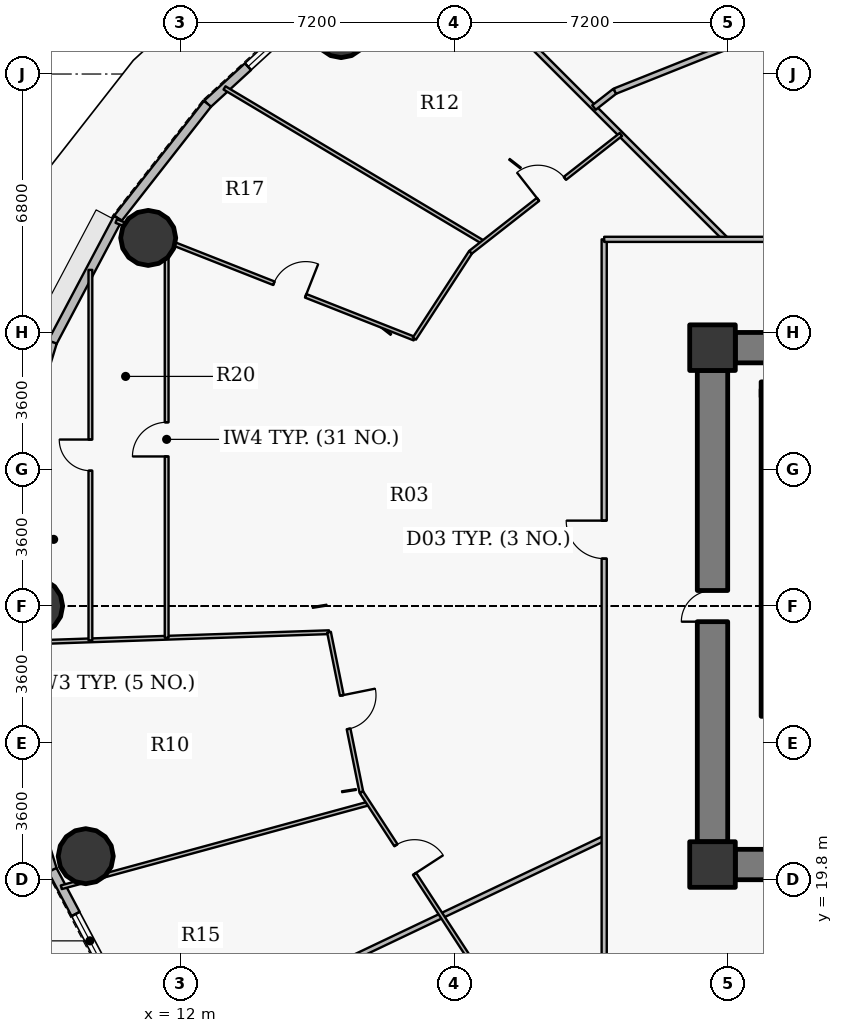
"""IFC4 building model, lengths in metres.
Left out: names, types, materials, properties, quantities, classifications, styles, units other than length and angle.
Written with IfcOpenShell. Run it as: python <this file> out.ifc"""

import sys

from ifc_helpers import new_model, si_unit, direction, frame, frame_2d, origin, origin_2d, place, context, subcontext, project, spatial, rectangle, hollow_circle, extrude, source, transform, mapped, element, fill, save


model = new_model("IFC4")
c1 = context("Model", 3, precision=1e-05, world=origin(), true_north=direction((0.0, 1.0)))
c2 = subcontext(c1, "Body", "Model", "MODEL_VIEW")
j1 = project(units=[si_unit("LENGTHUNIT", "METRE"), si_unit("PLANEANGLEUNIT", "RADIAN")], contexts=[c1])
p1 = place(None, origin())
s1 = spatial("IfcSite", under=j1, at=p1, CompositionType="ELEMENT")
p2 = place(p1, origin())
s2 = spatial("IfcBuilding", under=s1, at=p2, CompositionType="ELEMENT")
p3 = place(p2, frame((0.0, 0.0, 92.4)))
s3 = spatial("IfcBuildingStorey", under=s2, at=p3, CompositionType="ELEMENT", Elevation=92.4)
for number, where, z_axis, x_axis in (
    (1, (26.0, 20.2, 0.0), (0.0, 0.0, 1.0), (1.0, 0.0, 0.0)),
    (2, (26.0, 33.8, 0.0), (0.0, 0.0, 1.0), (1.0, 0.0, 0.0)),
):
    element("IfcColumn", number, at=place(p3, frame(where, z_axis=z_axis, x_axis=x_axis)), inside=s3, PredefinedType="COLUMN", context=c2, shape_type="SweptSolid", body=[
        extrude(rectangle(XDim=1.2, YDim=1.2, at=origin_2d()), origin(), (0.0, 0.0, 1.0), 4.8),
    ])
p4 = place(p3, frame((27.48, 24.1, 0.0), z_axis=(0.0, 0.0, 1.0), x_axis=(0.0, 1.0, 0.0)))
e3 = element("IfcWall", 3, at=p4, inside=s3, PredefinedType="SHEAR", context=c2, shape_type="SweptSolid", body=[
    extrude(rectangle(XDim=8.6, YDim=0.4, at=frame_2d((4.3, 0.0))), origin(), (0.0, 0.0, 1.0), 4.8),
])
p5 = place(p3, frame((27.28, 32.7, 0.0), z_axis=(0.0, 0.0, 1.0), x_axis=(1.0, 0.0, 0.0)))
e4 = element("IfcWall", 4, at=p5, inside=s3, PredefinedType="SHEAR", context=c2, shape_type="SweptSolid", body=[
    extrude(rectangle(XDim=4.1, YDim=0.4, at=frame_2d((2.05, 0.0))), origin(), (0.0, 0.0, 1.0), 4.8),
])
p6 = place(p3, frame((26.6, 33.8, 0.0), z_axis=(0.0, 0.0, 1.0), x_axis=(1.0, 0.0, 0.0)))
e5 = element("IfcWall", 5, at=p6, inside=s3, PredefinedType="SHEAR", context=c2, shape_type="SweptSolid", body=[
    extrude(rectangle(XDim=18.8, YDim=0.8, at=frame_2d((9.4, 0.0))), origin(), (0.0, 0.0, 1.0), 4.0),
])
p7 = place(p3, frame((45.4, 20.2, 0.0), z_axis=(0.0, 0.0, 1.0), x_axis=(-1.0, 0.0, 0.0)))
e6 = element("IfcWall", 6, at=p7, inside=s3, PredefinedType="SHEAR", context=c2, shape_type="SweptSolid", body=[
    extrude(rectangle(XDim=18.8, YDim=0.8, at=frame_2d((9.4, 0.0))), origin(), (0.0, 0.0, 1.0), 4.0),
])
p8 = place(p7, frame((10.15, 0.0, 0.0)))
e7 = element("IfcOpeningElement", 7, at=p8, cuts=e6, PredefinedType="OPENING", context=c2, shape_type="SweptSolid", body=[
    extrude(rectangle(XDim=1.15, YDim=2.15, at=origin_2d()), frame((0.575, 0.41, 1.075), z_axis=(0.0, -1.0, 0.0), x_axis=(1.0, 0.0, 0.0)), (0.0, 0.0, 1.0), 0.82),
])
p9 = place(p3, frame((26.0, 20.8, 0.0), z_axis=(0.0, 0.0, 1.0), x_axis=(0.0, 1.0, 0.0)))
e8 = element("IfcWall", 8, at=p9, inside=s3, PredefinedType="SHEAR", context=c2, shape_type="SweptSolid", body=[
    extrude(rectangle(XDim=12.4, YDim=0.8, at=frame_2d((6.2, 0.0))), origin(), (0.0, 0.0, 1.0), 4.0),
])
p10 = place(p9, frame((5.79, 0.0, 0.0)))
e9 = element("IfcOpeningElement", 9, at=p10, cuts=e8, PredefinedType="OPENING", context=c2, shape_type="SweptSolid", body=[
    extrude(rectangle(XDim=0.82, YDim=2.1, at=origin_2d()), frame((0.41, 0.41, 1.05), z_axis=(0.0, -1.0, 0.0), x_axis=(1.0, 0.0, 0.0)), (0.0, 0.0, 1.0), 0.82),
])
for number, where, z_axis, x_axis in (
    (10, (16.227, 42.156, -0.3), (0.0, 0.0, 1.0), (1.0, 0.0, 0.0)),
    (11, (11.151, 36.688, -0.3), (0.0, 0.0, 1.0), (1.0, 0.0, 0.0)),
    (12, (8.175, 27.0, -0.3), (0.0, 0.0, 1.0), (1.0, 0.0, 0.0)),
    (13, (9.507, 20.419, -0.3), (0.0, 0.0, 1.0), (1.0, 0.0, 0.0)),
):
    element("IfcColumn", number, at=place(p3, frame(where, z_axis=z_axis, x_axis=x_axis)), inside=s3, PredefinedType="COLUMN", context=c2, shape_type="SweptSolid", body=[
        extrude(hollow_circle(Radius=0.725, WallThickness=0.042, at=origin_2d()), origin(), (0.0, 0.0, 1.0), 5.1),
    ])
p11 = place(p3, frame((12.711, 40.217, 0.0), z_axis=(0.0, 0.0, 1.0), x_axis=(0.737113356241, 0.675769117414, 0.0)))
e14 = element("IfcWall", 14, at=p11, inside=s3, PredefinedType="SOLIDWALL", context=c2, shape_type="SweptSolid", body=[
    extrude(rectangle(XDim=3.976, YDim=0.24, at=frame_2d((1.988, 0.0))), origin(), (0.0, 0.0, 1.0), 4.55),
])
p12 = place(p11, frame((1.447, 0.0, 0.9)))
e15 = element("IfcOpeningElement", 15, at=p12, cuts=e14, PredefinedType="OPENING", context=c2, shape_type="SweptSolid", body=[
    extrude(rectangle(XDim=1.25, YDim=1.65, at=origin_2d()), frame((0.625, 0.13, 0.825), z_axis=(0.0, -1.0, 0.0), x_axis=(1.0, 0.0, 0.0)), (0.0, 0.0, 1.0), 0.26),
])
p13 = place(p3, frame((10.355, 37.206, 0.0), z_axis=(0.0, 0.0, 1.0), x_axis=(0.616272103517, 0.787533297345, 0.0)))
e16 = element("IfcWall", 16, at=p13, inside=s3, PredefinedType="SOLIDWALL", context=c2, shape_type="SweptSolid", body=[
    extrude(rectangle(XDim=3.823, YDim=0.24, at=frame_2d((1.912, 0.0))), origin(), (0.0, 0.0, 1.0), 4.55),
])
p14 = place(p3, frame((8.63, 33.945, 0.0), z_axis=(0.0, 0.0, 1.0), x_axis=(0.467614004126, 0.883932770716, 0.0)))
e17 = element("IfcWall", 17, at=p14, inside=s3, PredefinedType="SOLIDWALL", context=c2, shape_type="SweptSolid", body=[
    extrude(rectangle(XDim=3.689, YDim=0.24, at=frame_2d((1.844, 0.0))), origin(), (0.0, 0.0, 1.0), 4.55),
])
p15 = place(p3, frame((7.578, 30.515, 0.0), z_axis=(0.0, 0.0, 1.0), x_axis=(0.293124431344, 0.956074300329, 0.0)))
e18 = element("IfcWall", 18, at=p15, inside=s3, PredefinedType="SOLIDWALL", context=c2, shape_type="SweptSolid", body=[
    extrude(rectangle(XDim=3.587, YDim=0.24, at=frame_2d((1.793, 0.0))), origin(), (0.0, 0.0, 1.0), 4.55),
])
p16 = place(p15, frame((0.794, 0.0, 0.9)))
e19 = element("IfcOpeningElement", 19, at=p16, cuts=e18, PredefinedType="OPENING", context=c2, shape_type="SweptSolid", body=[
    extrude(rectangle(XDim=2.0, YDim=1.75, at=origin_2d()), frame((1.0, 0.13, 0.875), z_axis=(0.0, -1.0, 0.0), x_axis=(1.0, 0.0, 0.0)), (0.0, 0.0, 1.0), 0.26),
])
p17 = place(p3, frame((8.63, 20.055, 0.0), z_axis=(0.0, 0.0, 1.0), x_axis=(-0.293124431344, 0.956074300329, 0.0)))
e20 = element("IfcWall", 20, at=p17, inside=s3, PredefinedType="SOLIDWALL", context=c2, shape_type="SweptSolid", body=[
    extrude(rectangle(XDim=3.587, YDim=0.24, at=frame_2d((1.793, 0.0))), origin(), (0.0, 0.0, 1.0), 4.55),
])
p18 = place(p3, frame((10.355, 16.794, 0.0), z_axis=(0.0, 0.0, 1.0), x_axis=(-0.467614004126, 0.883932770716, 0.0)))
e21 = element("IfcWall", 21, at=p18, inside=s3, PredefinedType="SOLIDWALL", context=c2, shape_type="SweptSolid", body=[
    extrude(rectangle(XDim=3.689, YDim=0.24, at=frame_2d((1.844, 0.0))), origin(), (0.0, 0.0, 1.0), 4.55),
])
p19 = place(p18, frame((0.781, 0.0, 0.9)))
e22 = element("IfcOpeningElement", 22, at=p19, cuts=e21, PredefinedType="OPENING", context=c2, shape_type="SweptSolid", body=[
    extrude(rectangle(XDim=1.6, YDim=1.75, at=origin_2d()), frame((0.8, 0.13, 0.875), z_axis=(0.0, -1.0, 0.0), x_axis=(1.0, 0.0, 0.0)), (0.0, 0.0, 1.0), 0.26),
])
p20 = place(p3, frame((7.319, 26.019, 0.0), z_axis=(0.0, 0.0, 1.0), x_axis=(0.999416042933, 0.034169769216, 0.0)))
e23 = element("IfcWall", 23, at=p20, inside=s3, PredefinedType="PARTITIONING", context=c2, shape_type="SweptSolid", body=[
    extrude(rectangle(XDim=8.595, YDim=0.1, at=frame_2d((4.298, 0.0))), origin(), (0.0, 0.0, 1.0), 3.985),
])
p21 = place(p3, frame((8.864, 19.602, 0.0), z_axis=(0.0, 0.0, 1.0), x_axis=(0.964794050911, 0.263006538565, 0.0)))
e24 = element("IfcWall", 24, at=p21, inside=s3, PredefinedType="PARTITIONING", context=c2, shape_type="SweptSolid", body=[
    extrude(rectangle(XDim=8.385, YDim=0.1, at=frame_2d((4.192, 0.0))), origin(), (0.0, 0.0, 1.0), 3.985),
])
p22 = place(p3, frame((9.63, 26.098, 0.0), z_axis=(0.0, 0.0, 1.0), x_axis=(0.0, 1.0, 0.0)))
e25 = element("IfcWall", 25, at=p22, inside=s3, PredefinedType="PARTITIONING", context=c2, shape_type="SweptSolid", body=[
    extrude(rectangle(XDim=9.748, YDim=0.1, at=frame_2d((4.874, 0.0))), origin(), (0.0, 0.0, 1.0), 3.985),
])
p23 = place(p22, frame((4.464, 0.0, 0.0)))
e26 = element("IfcOpeningElement", 26, at=p23, cuts=e25, PredefinedType="OPENING", context=c2, shape_type="SweptSolid", body=[
    extrude(rectangle(XDim=0.82, YDim=2.1, at=origin_2d()), frame((0.41, 0.06, 1.05), z_axis=(0.0, -1.0, 0.0), x_axis=(1.0, 0.0, 0.0)), (0.0, 0.0, 1.0), 0.12),
])
p24 = place(p3, frame((10.309, 37.131, 0.0), z_axis=(0.0, 0.0, 1.0), x_axis=(0.930286568853, -0.366833613251, 0.0)))
e27 = element("IfcWall", 27, at=p24, inside=s3, PredefinedType="PARTITIONING", context=c2, shape_type="SweptSolid", body=[
    extrude(rectangle(XDim=8.432, YDim=0.1, at=frame_2d((4.216, 0.0))), origin(), (0.0, 0.0, 1.0), 3.985),
])
p25 = place(p24, frame((4.459, 0.0, 0.0)))
e28 = element("IfcOpeningElement", 28, at=p25, cuts=e27, PredefinedType="OPENING", context=c2, shape_type="SweptSolid", body=[
    extrude(rectangle(XDim=0.9, YDim=2.1, at=origin_2d()), frame((0.45, 0.06, 1.05), z_axis=(0.0, -1.0, 0.0), x_axis=(1.0, 0.0, 0.0)), (0.0, 0.0, 1.0), 0.12),
])
p26 = place(p3, frame((11.486, 15.34, 0.0), z_axis=(0.0, 0.0, 1.0), x_axis=(0.903055043221, 0.429524840857, 0.0)))
e29 = element("IfcWall", 29, at=p26, inside=s3, PredefinedType="PARTITIONING", context=c2, shape_type="SweptSolid", body=[
    extrude(rectangle(XDim=12.916, YDim=0.135, at=frame_2d((6.458, 0.0))), origin(), (0.0, 0.0, 1.0), 3.985),
])
p27 = place(p3, frame((11.636, 26.167, 0.0), z_axis=(0.0, 0.0, 1.0), x_axis=(0.0, 1.0, 0.0)))
e30 = element("IfcWall", 30, at=p27, inside=s3, PredefinedType="PARTITIONING", context=c2, shape_type="SweptSolid", body=[
    extrude(rectangle(XDim=10.44, YDim=0.1, at=frame_2d((5.22, 0.0))), origin(), (0.0, 0.0, 1.0), 3.985),
])
p28 = place(p27, frame((4.77, 0.0, 0.0)))
e31 = element("IfcOpeningElement", 31, at=p28, cuts=e30, PredefinedType="OPENING", context=c2, shape_type="SweptSolid", body=[
    extrude(rectangle(XDim=0.9, YDim=2.1, at=origin_2d()), frame((0.45, 0.06, 1.05), z_axis=(0.0, -1.0, 0.0), x_axis=(1.0, 0.0, 0.0)), (0.0, 0.0, 1.0), 0.12),
])
p29 = place(p3, frame((13.159, 40.634, 0.0), z_axis=(0.0, 0.0, 1.0), x_axis=(0.858651150201, -0.512560437664, 0.0)))
e32 = element("IfcWall", 32, at=p29, inside=s3, PredefinedType="PARTITIONING", context=c2, shape_type="SweptSolid", body=[
    extrude(rectangle(XDim=7.927, YDim=0.1, at=frame_2d((3.963, 0.0))), origin(), (0.0, 0.0, 1.0), 3.985),
])
p30 = place(p3, frame((15.909, 26.313, 0.0), z_axis=(0.0, 0.0, 1.0), x_axis=(0.198237240658, -0.980154067694, 0.0)))
e33 = element("IfcWall", 33, at=p30, inside=s3, PredefinedType="PARTITIONING", context=c2, shape_type="SweptSolid", body=[
    extrude(rectangle(XDim=4.293, YDim=0.1, at=frame_2d((2.146, 0.0))), origin(), (0.0, 0.0, 1.0), 3.985),
])
p31 = place(p30, frame((1.697, 0.0, 0.0)))
e34 = element("IfcOpeningElement", 34, at=p31, cuts=e33, PredefinedType="OPENING", context=c2, shape_type="SweptSolid", body=[
    extrude(rectangle(XDim=0.9, YDim=2.1, at=origin_2d()), frame((0.45, 0.06, 1.05), z_axis=(0.0, -1.0, 0.0), x_axis=(1.0, 0.0, 0.0)), (0.0, 0.0, 1.0), 0.12),
])
p32 = place(p3, frame((16.76, 22.105, 0.0), z_axis=(0.0, 0.0, 1.0), x_axis=(0.545405249109, -0.838172484781, 0.0)))
e35 = element("IfcWall", 35, at=p32, inside=s3, PredefinedType="PARTITIONING", context=c2, shape_type="SweptSolid", body=[
    extrude(rectangle(XDim=5.269, YDim=0.1, at=frame_2d((2.634, 0.0))), origin(), (0.0, 0.0, 1.0), 3.985),
])
p33 = place(p32, frame((1.666, 0.0, 0.0)))
e36 = element("IfcOpeningElement", 36, at=p33, cuts=e35, PredefinedType="OPENING", context=c2, shape_type="SweptSolid", body=[
    extrude(rectangle(XDim=0.9, YDim=2.1, at=origin_2d()), frame((0.45, 0.06, 1.05), z_axis=(0.0, -1.0, 0.0), x_axis=(1.0, 0.0, 0.0)), (0.0, 0.0, 1.0), 0.12),
])
p34 = place(p3, frame((18.154, 34.037, 0.0), z_axis=(0.0, 0.0, 1.0), x_axis=(0.545361556746, 0.838200914115, 0.0)))
e37 = element("IfcWall", 37, at=p34, inside=s3, PredefinedType="PARTITIONING", context=c2, shape_type="SweptSolid", body=[
    extrude(rectangle(XDim=2.713, YDim=0.1, at=frame_2d((1.356, 0.0))), origin(), (0.0, 0.0, 1.0), 3.985),
])
p35 = place(p3, frame((18.308, 44.692, 0.0), z_axis=(0.0, 0.0, 1.0), x_axis=(0.707106781187, -0.707106781187, 0.0)))
e38 = element("IfcWall", 38, at=p35, inside=s3, PredefinedType="PARTITIONING", context=c2, shape_type="SweptSolid", body=[
    extrude(rectangle(XDim=11.374, YDim=0.135, at=frame_2d((5.687, 0.0))), origin(), (0.0, 0.0, 1.0), 3.985),
])
p36 = place(p3, frame((19.634, 36.311, 0.0), z_axis=(0.0, 0.0, 1.0), x_axis=(0.787333773608, 0.616526989625, 0.0)))
e39 = element("IfcWall", 39, at=p36, inside=s3, PredefinedType="PARTITIONING", context=c2, shape_type="SweptSolid", body=[
    extrude(rectangle(XDim=5.026, YDim=0.1, at=frame_2d((2.513, 0.0))), origin(), (0.0, 0.0, 1.0), 3.985),
])
p37 = place(p36, frame((2.254, 0.0, 0.0)))
e40 = element("IfcOpeningElement", 40, at=p37, cuts=e39, PredefinedType="OPENING", context=c2, shape_type="SweptSolid", body=[
    extrude(rectangle(XDim=0.9, YDim=2.1, at=origin_2d()), frame((0.45, 0.06, 1.05), z_axis=(0.0, -1.0, 0.0), x_axis=(1.0, 0.0, 0.0)), (0.0, 0.0, 1.0), 0.12),
])
p38 = place(p3, frame((22.881, 40.119, 0.0), z_axis=(0.0, 0.0, 1.0), x_axis=(0.787460608079, 0.616364981747, 0.0)))
e41 = element("IfcWall", 41, at=p38, inside=s3, PredefinedType="PARTITIONING", context=c2, shape_type="SweptSolid", body=[
    extrude(rectangle(XDim=0.696, YDim=0.15, at=frame_2d((0.348, 0.0))), origin(), (0.0, 0.0, 1.0), 4.55),
])
p39 = place(p3, frame((23.15, 17.35, 0.0), z_axis=(0.0, 0.0, 1.0), x_axis=(0.0, 1.0, 0.0)))
e42 = element("IfcWall", 42, at=p39, inside=s3, PredefinedType="PARTITIONING", context=c2, shape_type="SweptSolid", body=[
    extrude(rectangle(XDim=19.3, YDim=0.135, at=frame_2d((9.65, 0.0))), origin(), (0.0, 0.0, 1.0), 3.985),
])
p40 = place(p39, frame((10.899, 0.0, 0.0)))
e43 = element("IfcOpeningElement", 43, at=p40, cuts=e42, PredefinedType="OPENING", context=c2, shape_type="SweptSolid", body=[
    extrude(rectangle(XDim=1.0, YDim=2.15, at=origin_2d()), frame((0.5, 0.078, 1.075), z_axis=(0.0, -1.0, 0.0), x_axis=(1.0, 0.0, 0.0)), (0.0, 0.0, 1.0), 0.155),
])
p41 = place(p3, frame((23.15, 36.65, 0.0), z_axis=(0.0, 0.0, 1.0), x_axis=(1.0, 0.0, 0.0)))
e44 = element("IfcWall", 44, at=p41, inside=s3, PredefinedType="PARTITIONING", context=c2, shape_type="SweptSolid", body=[
    extrude(rectangle(XDim=25.7, YDim=0.135, at=frame_2d((12.85, 0.0))), origin(), (0.0, 0.0, 1.0), 3.985),
])
p42 = place(p41, frame((13.736, 0.0, 0.0)))
e45 = element("IfcOpeningElement", 45, at=p42, cuts=e44, PredefinedType="OPENING", context=c2, shape_type="SweptSolid", body=[
    extrude(rectangle(XDim=1.05, YDim=2.15, at=origin_2d()), frame((0.525, 0.078, 1.075), z_axis=(0.0, -1.0, 0.0), x_axis=(1.0, 0.0, 0.0)), (0.0, 0.0, 1.0), 0.155),
])
p43 = place(p41, frame((6.195, 0.0, 0.0)))
e46 = element("IfcOpeningElement", 46, at=p43, cuts=e44, PredefinedType="OPENING", context=c2, shape_type="SweptSolid", body=[
    extrude(rectangle(XDim=0.82, YDim=2.1, at=origin_2d()), frame((0.41, 0.078, 1.05), z_axis=(0.0, -1.0, 0.0), x_axis=(1.0, 0.0, 0.0)), (0.0, 0.0, 1.0), 0.155),
])
p44 = place(p3, frame((23.43, 40.548, 0.0), z_axis=(0.0, 0.0, 1.0), x_axis=(0.928798989983, 0.370583912503, 0.0)))
e47 = element("IfcWall", 47, at=p44, inside=s3, PredefinedType="PARTITIONING", context=c2, shape_type="SweptSolid", body=[
    extrude(rectangle(XDim=6.419, YDim=0.15, at=frame_2d((3.209, 0.0))), origin(), (0.0, 0.0, 1.0), 3.985),
])
p45 = place(p3, frame((26.59, 34.2, 0.0), z_axis=(0.0, 0.0, 1.0), x_axis=(-1.0, 0.0, 0.0)))
e48 = element("IfcWall", 48, at=p45, inside=s3, PredefinedType="PARTITIONING", context=c2, shape_type="SweptSolid", body=[
    extrude(rectangle(XDim=0.99, YDim=0.135, at=frame_2d((0.495, 0.0))), origin(), (0.0, 0.0, 1.0), 3.985),
])
p46 = place(p3, frame((25.6, 33.893, 0.0), z_axis=(0.0, 0.0, 1.0), x_axis=(0.0, -1.0, 0.0)))
e49 = element("IfcWall", 49, at=p46, inside=s3, PredefinedType="PARTITIONING", context=c2, shape_type="SweptSolid", body=[
    extrude(rectangle(XDim=0.683, YDim=0.135, at=frame_2d((0.341, 0.0))), origin(), (0.0, 0.0, 1.0), 4.55),
])
p47 = place(p3, frame((25.6, 20.79, 0.0), z_axis=(0.0, 0.0, 1.0), x_axis=(0.0, -1.0, 0.0)))
e50 = element("IfcWall", 50, at=p47, inside=s3, PredefinedType="PARTITIONING", context=c2, shape_type="SweptSolid", body=[
    extrude(rectangle(XDim=0.99, YDim=0.135, at=frame_2d((0.495, 0.0))), origin(), (0.0, 0.0, 1.0), 4.55),
])
p48 = place(p3, frame((25.907, 19.8, 0.0), z_axis=(0.0, 0.0, 1.0), x_axis=(1.0, 0.0, 0.0)))
e51 = element("IfcWall", 51, at=p48, inside=s3, PredefinedType="PARTITIONING", context=c2, shape_type="SweptSolid", body=[
    extrude(rectangle(XDim=0.683, YDim=0.135, at=frame_2d((0.341, 0.0))), origin(), (0.0, 0.0, 1.0), 3.985),
])
m1 = source(origin(), c2, "Body", "SweptSolid", [
    extrude(rectangle(XDim=1.6, YDim=1.75, at=origin_2d()), frame((0.8, 0.03, 0.875), z_axis=(0.0, -1.0, 0.0), x_axis=(1.0, 0.0, 0.0)), (0.0, 0.0, 1.0), 0.06),
])
p49 = place(p19, origin())
e52 = element("IfcWindow", 52, at=p49, inside=s3, PartitioningType="DOUBLE_PANEL_VERTICAL", PredefinedType="WINDOW", context=c2, shape_type="MappedRepresentation", body=[
    mapped(m1, transform((0.0, 0.0, 0.0), x_axis=(1.0, 0.0, 0.0), y_axis=(0.0, 1.0, 0.0), z_axis=(0.0, 0.0, 1.0), scale=1.0)),
])
fill(e22, e52)
m2 = source(origin(), c2, "Body", "SweptSolid", [
    extrude(rectangle(XDim=1.25, YDim=1.65, at=origin_2d()), frame((0.625, 0.03, 0.825), z_axis=(0.0, -1.0, 0.0), x_axis=(1.0, 0.0, 0.0)), (0.0, 0.0, 1.0), 0.06),
])
p50 = place(p12, origin())
e53 = element("IfcWindow", 53, at=p50, inside=s3, PartitioningType="SINGLE_PANEL", PredefinedType="WINDOW", context=c2, shape_type="MappedRepresentation", body=[
    mapped(m2, transform((0.0, 0.0, 0.0), x_axis=(1.0, 0.0, 0.0), y_axis=(0.0, 1.0, 0.0), z_axis=(0.0, 0.0, 1.0), scale=1.0)),
])
fill(e15, e53)
m3 = source(origin(), c2, "Body", "SweptSolid", [
    extrude(rectangle(XDim=0.82, YDim=2.1, at=origin_2d()), frame((0.41, 0.025, 1.05), z_axis=(0.0, -1.0, 0.0), x_axis=(1.0, 0.0, 0.0)), (0.0, 0.0, 1.0), 0.05),
])
p51 = place(p10, origin())
e54 = element("IfcDoor", 54, at=p51, inside=s3, OperationType="SINGLE_SWING_LEFT", PredefinedType="DOOR", context=c2, shape_type="MappedRepresentation", body=[
    mapped(m3, transform((0.0, 0.0, 0.0), x_axis=(1.0, 0.0, 0.0), y_axis=(0.0, 1.0, 0.0), z_axis=(0.0, 0.0, 1.0), scale=1.0)),
])
fill(e9, e54)
m4 = source(origin(), c2, "Body", "SweptSolid", [
    extrude(rectangle(XDim=1.0, YDim=2.15, at=origin_2d()), frame((0.5, 0.025, 1.075), z_axis=(0.0, -1.0, 0.0), x_axis=(1.0, 0.0, 0.0)), (0.0, 0.0, 1.0), 0.05),
])
p52 = place(p40, origin())
e55 = element("IfcDoor", 55, at=p52, inside=s3, OperationType="SINGLE_SWING_RIGHT", PredefinedType="DOOR", context=c2, shape_type="MappedRepresentation", body=[
    mapped(m4, transform((0.0, 0.0, 0.0), x_axis=(1.0, 0.0, 0.0), y_axis=(0.0, 1.0, 0.0), z_axis=(0.0, 0.0, 1.0), scale=1.0)),
])
fill(e43, e55)
m5 = source(origin(), c2, "Body", "SweptSolid", [
    extrude(rectangle(XDim=0.9, YDim=2.1, at=origin_2d()), frame((0.45, 0.025, 1.05), z_axis=(0.0, -1.0, 0.0), x_axis=(1.0, 0.0, 0.0)), (0.0, 0.0, 1.0), 0.05),
])
p53 = place(p37, origin())
e56 = element("IfcDoor", 56, at=p53, inside=s3, OperationType="SINGLE_SWING_LEFT", PredefinedType="DOOR", context=c2, shape_type="MappedRepresentation", body=[
    mapped(m5, transform((0.0, 0.0, 0.0), x_axis=(1.0, 0.0, 0.0), y_axis=(0.0, 1.0, 0.0), z_axis=(0.0, 0.0, 1.0), scale=1.0)),
])
fill(e40, e56)
p54 = place(p25, origin())
e57 = element("IfcDoor", 57, at=p54, inside=s3, OperationType="SINGLE_SWING_RIGHT", PredefinedType="DOOR", context=c2, shape_type="MappedRepresentation", body=[
    mapped(m5, transform((0.0, 0.0, 0.0), x_axis=(1.0, 0.0, 0.0), y_axis=(0.0, 1.0, 0.0), z_axis=(0.0, 0.0, 1.0), scale=1.0)),
])
fill(e28, e57)
p55 = place(p31, origin())
e58 = element("IfcDoor", 58, at=p55, inside=s3, OperationType="SINGLE_SWING_LEFT", PredefinedType="DOOR", context=c2, shape_type="MappedRepresentation", body=[
    mapped(m5, transform((0.0, 0.0, 0.0), x_axis=(1.0, 0.0, 0.0), y_axis=(0.0, 1.0, 0.0), z_axis=(0.0, 0.0, 1.0), scale=1.0)),
])
fill(e34, e58)
p56 = place(p33, origin())
e59 = element("IfcDoor", 59, at=p56, inside=s3, OperationType="SINGLE_SWING_RIGHT", PredefinedType="DOOR", context=c2, shape_type="MappedRepresentation", body=[
    mapped(m5, transform((0.0, 0.0, 0.0), x_axis=(1.0, 0.0, 0.0), y_axis=(0.0, 1.0, 0.0), z_axis=(0.0, 0.0, 1.0), scale=1.0)),
])
fill(e36, e59)
p57 = place(p28, origin())
e60 = element("IfcDoor", 60, at=p57, inside=s3, OperationType="SINGLE_SWING_LEFT", PredefinedType="DOOR", context=c2, shape_type="MappedRepresentation", body=[
    mapped(m5, transform((0.0, 0.0, 0.0), x_axis=(1.0, 0.0, 0.0), y_axis=(0.0, 1.0, 0.0), z_axis=(0.0, 0.0, 1.0), scale=1.0)),
])
fill(e31, e60)
p58 = place(p23, origin())
e61 = element("IfcDoor", 61, at=p58, inside=s3, OperationType="SINGLE_SWING_RIGHT", PredefinedType="DOOR", context=c2, shape_type="MappedRepresentation", body=[
    mapped(m3, transform((0.0, 0.0, 0.0), x_axis=(1.0, 0.0, 0.0), y_axis=(0.0, 1.0, 0.0), z_axis=(0.0, 0.0, 1.0), scale=1.0)),
])
fill(e26, e61)
save(model, sys.argv[1])
